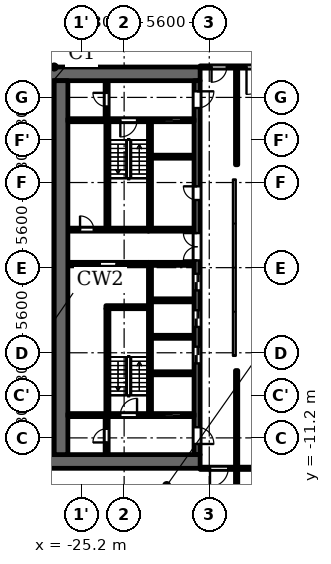
"""IFC4 building model, lengths in metres.
Left out: names, types, materials, properties, quantities, classifications, styles, units other than length and angle.
Written with IfcOpenShell. Run it as: python <this file> out.ifc"""

import sys

from ifc_helpers import new_model, si_unit, direction, frame, frame_2d, origin, origin_2d, place, context, subcontext, project, spatial, polyline, rectangle, outline, extrude, element, fill, save


model = new_model("IFC4")
c1 = context("Model", 3, precision=1e-05, world=origin(), true_north=direction((0.0, 1.0)))
c2 = subcontext(c1, "Body", "Model", "MODEL_VIEW")
j1 = project(units=[si_unit("LENGTHUNIT", "METRE"), si_unit("PLANEANGLEUNIT", "RADIAN")], contexts=[c1])
p1 = place(None, origin())
s1 = spatial("IfcSite", under=j1, at=p1, CompositionType="ELEMENT")
p2 = place(p1, origin())
s2 = spatial("IfcBuilding", under=s1, at=p2, CompositionType="ELEMENT")
p3 = place(p2, origin())
s3 = spatial("IfcBuildingStorey", under=s2, at=p3, CompositionType="ELEMENT", Elevation=0.0)
for number, where, z_axis, x_axis in (
    (1, (-28.0, 11.2, 0.0), (0.0, 0.0, 1.0), (1.0, 0.0, 0.0)),
    (2, (-28.0, 5.6, 0.0), (0.0, 0.0, 1.0), (1.0, 0.0, 0.0)),
    (3, (-28.0, 0.0, 0.0), (0.0, 0.0, 1.0), (1.0, 0.0, 0.0)),
    (4, (-28.0, -5.6, 0.0), (0.0, 0.0, 1.0), (1.0, 0.0, 0.0)),
    (5, (-28.0, -11.2, 0.0), (0.0, 0.0, 1.0), (1.0, 0.0, 0.0)),
):
    element("IfcColumn", number, at=place(p3, frame(where, z_axis=z_axis, x_axis=x_axis)), inside=s3, PredefinedType="COLUMN", context=c2, shape_type="SweptSolid", body=[
        extrude(rectangle(XDim=1.8, YDim=1.8, at=origin_2d()), origin(), (0.0, 0.0, 1.0), 6.5),
    ])
p4 = place(p3, frame((-20.7, 2.6, 0.0), z_axis=(0.0, 0.0, 1.0), x_axis=(0.0, 1.0, 0.0)))
e6 = element("IfcWall", 6, at=p4, inside=s3, PredefinedType="SHEAR", context=c2, shape_type="SweptSolid", body=[
    extrude(rectangle(XDim=7.0, YDim=0.2, at=frame_2d((3.5, 0.0))), origin(), (0.0, 0.0, 1.0), 6.15),
])
p5 = place(p3, frame((-20.7, -9.6, 0.0), z_axis=(0.0, 0.0, 1.0), x_axis=(0.0, 1.0, 0.0)))
e7 = element("IfcWall", 7, at=p5, inside=s3, PredefinedType="SHEAR", context=c2, shape_type="SweptSolid", body=[
    extrude(rectangle(XDim=9.75, YDim=0.2, at=frame_2d((4.875, 0.0))), origin(), (0.0, 0.0, 1.0), 6.15),
])
p6 = place(p3, frame((-20.8, 2.5, 0.0), z_axis=(0.0, 0.0, 1.0), x_axis=(-1.0, 0.0, 0.0)))
e8 = element("IfcWall", 8, at=p6, inside=s3, PredefinedType="SHEAR", context=c2, shape_type="SweptSolid", body=[
    extrude(rectangle(XDim=5.3, YDim=0.2, at=frame_2d((2.65, 0.0))), origin(), (0.0, 0.0, 1.0), 6.15),
])
p7 = place(p6, frame((3.6, 0.0, 0.0)))
e9 = element("IfcOpeningElement", 9, at=p7, cuts=e8, PredefinedType="OPENING", context=c2, shape_type="SweptSolid", body=[
    extrude(rectangle(XDim=0.9, YDim=2.1, at=frame_2d((0.45, 1.05))), frame((0.0, 0.11, 0.0), z_axis=(0.0, -1.0, 0.0), x_axis=(1.0, 0.0, 0.0)), (0.0, 0.0, 1.0), 0.22),
])
p8 = place(p3, frame((-20.8, 0.25, 0.0), z_axis=(0.0, 0.0, 1.0), x_axis=(-1.0, 0.0, 0.0)))
e10 = element("IfcWall", 10, at=p8, inside=s3, PredefinedType="PARTITIONING", context=c2, shape_type="SweptSolid", body=[
    extrude(rectangle(XDim=5.3, YDim=0.2, at=frame_2d((2.65, 0.0))), origin(), (0.0, 0.0, 1.0), 6.15),
])
p9 = place(p8, frame((2.1, 0.0, 0.0)))
e11 = element("IfcOpeningElement", 11, at=p9, cuts=e10, PredefinedType="OPENING", context=c2, shape_type="SweptSolid", body=[
    extrude(rectangle(XDim=1.1, YDim=2.1, at=frame_2d((0.55, 1.05))), frame((0.0, 0.11, 0.0), z_axis=(0.0, -1.0, 0.0), x_axis=(1.0, 0.0, 0.0)), (0.0, 0.0, 1.0), 0.22),
])
for number, where, z_axis, x_axis in (
    (12, (-17.4, 12.75, 0.0), (0.0, 0.0, 1.0), (-1.0, 0.0, 0.0)),
    (13, (-17.4, -12.75, 0.0), (0.0, 0.0, 1.0), (-1.0, 0.0, 0.0)),
):
    element("IfcWall", number, at=place(p3, frame(where, z_axis=z_axis, x_axis=x_axis)), inside=s3, PredefinedType="SHEAR", context=c2, shape_type="SweptSolid", body=[
        extrude(rectangle(XDim=10.4, YDim=0.9, at=frame_2d((5.2, 0.0))), origin(), (0.0, 0.0, 1.0), 6.15),
    ])
p10 = place(p3, frame((-17.6, -12.3, 0.0), z_axis=(0.0, 0.0, 1.0), x_axis=(0.0, 1.0, 0.0)))
e14 = element("IfcWall", 14, at=p10, inside=s3, PredefinedType="SHEAR", context=c2, shape_type="SweptSolid", body=[
    extrude(rectangle(XDim=24.6, YDim=0.4, at=frame_2d((12.3, 0.0))), origin(), (0.0, 0.0, 1.0), 6.15),
])
p11 = place(p10, frame((6.0, 0.0, 0.0)))
e15 = element("IfcOpeningElement", 15, at=p11, cuts=e14, PredefinedType="OPENING", context=c2, shape_type="SweptSolid", body=[
    extrude(rectangle(XDim=1.1, YDim=2.1, at=frame_2d((0.55, 1.05))), frame((0.0, 0.21, 0.0), z_axis=(0.0, -1.0, 0.0), x_axis=(1.0, 0.0, 0.0)), (0.0, 0.0, 1.0), 0.42),
])
p12 = place(p10, frame((8.4, 0.0, 0.0)))
e16 = element("IfcOpeningElement", 16, at=p12, cuts=e14, PredefinedType="OPENING", context=c2, shape_type="SweptSolid", body=[
    extrude(rectangle(XDim=1.1, YDim=2.1, at=frame_2d((0.55, 1.05))), frame((0.0, 0.21, 0.0), z_axis=(0.0, -1.0, 0.0), x_axis=(1.0, 0.0, 0.0)), (0.0, 0.0, 1.0), 0.42),
])
p13 = place(p10, frame((10.8, 0.0, 0.0)))
e17 = element("IfcOpeningElement", 17, at=p13, cuts=e14, PredefinedType="OPENING", context=c2, shape_type="SweptSolid", body=[
    extrude(rectangle(XDim=1.1, YDim=2.1, at=frame_2d((0.55, 1.05))), frame((0.0, 0.21, 0.0), z_axis=(0.0, -1.0, 0.0), x_axis=(1.0, 0.0, 0.0)), (0.0, 0.0, 1.0), 0.42),
])
p14 = place(p10, frame((16.75, 0.0, 0.0)))
e18 = element("IfcOpeningElement", 18, at=p14, cuts=e14, PredefinedType="OPENING", context=c2, shape_type="SweptSolid", body=[
    extrude(rectangle(XDim=0.9, YDim=2.1, at=frame_2d((0.45, 1.05))), frame((0.0, 0.21, 0.0), z_axis=(0.0, -1.0, 0.0), x_axis=(1.0, 0.0, 0.0)), (0.0, 0.0, 1.0), 0.42),
])
p15 = place(p10, frame((22.8, 0.0, 0.0)))
e19 = element("IfcOpeningElement", 19, at=p15, cuts=e14, PredefinedType="OPENING", context=c2, shape_type="SweptSolid", body=[
    extrude(rectangle(XDim=1.1, YDim=2.1, at=frame_2d((0.55, 1.05))), frame((0.0, 0.21, 0.0), z_axis=(0.0, -1.0, 0.0), x_axis=(1.0, 0.0, 0.0)), (0.0, 0.0, 1.0), 0.42),
])
p16 = place(p10, frame((0.7, 0.0, 0.0)))
e20 = element("IfcOpeningElement", 20, at=p16, cuts=e14, PredefinedType="OPENING", context=c2, shape_type="SweptSolid", body=[
    extrude(rectangle(XDim=1.1, YDim=2.1, at=frame_2d((0.55, 1.05))), frame((0.0, 0.21, 0.0), z_axis=(0.0, -1.0, 0.0), x_axis=(1.0, 0.0, 0.0)), (0.0, 0.0, 1.0), 0.42),
])
p17 = place(p10, frame((12.775, 0.0, 0.0)))
e21 = element("IfcOpeningElement", 21, at=p17, cuts=e14, PredefinedType="OPENING", context=c2, shape_type="SweptSolid", body=[
    extrude(rectangle(XDim=1.8, YDim=2.1, at=frame_2d((0.9, 1.05))), frame((0.0, 0.21, 0.0), z_axis=(0.0, -1.0, 0.0), x_axis=(1.0, 0.0, 0.0)), (0.0, 0.0, 1.0), 0.42),
])
p18 = place(p3, frame((-26.55, -12.3, 0.0), z_axis=(0.0, 0.0, 1.0), x_axis=(0.0, 1.0, 0.0)))
e22 = element("IfcWall", 22, at=p18, inside=s3, PredefinedType="SHEAR", context=c2, shape_type="SweptSolid", body=[
    extrude(rectangle(XDim=24.6, YDim=0.9, at=frame_2d((12.3, 0.0))), origin(), (0.0, 0.0, 1.0), 6.15),
])
p19 = place(p3, frame((-23.55, 9.8, 0.0), z_axis=(0.0, 0.0, 1.0), x_axis=(0.0, 1.0, 0.0)))
e23 = element("IfcWall", 23, at=p19, inside=s3, PredefinedType="PARTITIONING", context=c2, shape_type="SweptSolid", body=[
    extrude(rectangle(XDim=2.5, YDim=0.2, at=frame_2d((1.25, 0.0))), origin(), (0.0, 0.0, 1.0), 6.15),
])
p20 = place(p19, frame((0.8, 0.0, 0.0)))
e24 = element("IfcOpeningElement", 24, at=p20, cuts=e23, PredefinedType="OPENING", context=c2, shape_type="SweptSolid", body=[
    extrude(rectangle(XDim=0.9, YDim=2.1, at=frame_2d((0.45, 1.05))), frame((0.0, 0.11, 0.0), z_axis=(0.0, -1.0, 0.0), x_axis=(1.0, 0.0, 0.0)), (0.0, 0.0, 1.0), 0.22),
])
p21 = place(p3, frame((-23.55, -12.3, 0.0), z_axis=(0.0, 0.0, 1.0), x_axis=(0.0, 1.0, 0.0)))
e25 = element("IfcWall", 25, at=p21, inside=s3, PredefinedType="PARTITIONING", context=c2, shape_type="SweptSolid", body=[
    extrude(rectangle(XDim=2.5, YDim=0.2, at=frame_2d((1.25, 0.0))), origin(), (0.0, 0.0, 1.0), 6.15),
])
p22 = place(p21, frame((0.8, 0.0, 0.0)))
e26 = element("IfcOpeningElement", 26, at=p22, cuts=e25, PredefinedType="OPENING", context=c2, shape_type="SweptSolid", body=[
    extrude(rectangle(XDim=0.9, YDim=2.1, at=frame_2d((0.45, 1.05))), frame((0.0, 0.11, 0.0), z_axis=(0.0, -1.0, 0.0), x_axis=(1.0, 0.0, 0.0)), (0.0, 0.0, 1.0), 0.22),
])
p23 = place(p3, frame((-17.8, -9.7, 0.0), z_axis=(0.0, 0.0, 1.0), x_axis=(-1.0, 0.0, 0.0)))
e27 = element("IfcWall", 27, at=p23, inside=s3, PredefinedType="SHEAR", context=c2, shape_type="SweptSolid", body=[
    extrude(rectangle(XDim=8.3, YDim=0.2, at=frame_2d((4.15, 0.0))), origin(), (0.0, 0.0, 1.0), 6.15),
])
p24 = place(p23, frame((0.85, 0.0, 0.0)))
e28 = element("IfcOpeningElement", 28, at=p24, cuts=e27, PredefinedType="OPENING", context=c2, shape_type="SweptSolid", body=[
    extrude(rectangle(XDim=1.1, YDim=2.1, at=frame_2d((0.55, 1.05))), frame((0.0, 0.11, 0.0), z_axis=(0.0, -1.0, 0.0), x_axis=(1.0, 0.0, 0.0)), (0.0, 0.0, 1.0), 0.22),
])
p25 = place(p23, frame((3.75, 0.0, 0.0)))
e29 = element("IfcOpeningElement", 29, at=p25, cuts=e27, PredefinedType="OPENING", context=c2, shape_type="SweptSolid", body=[
    extrude(rectangle(XDim=1.1, YDim=2.1, at=frame_2d((0.55, 1.05))), frame((0.0, 0.11, 0.0), z_axis=(0.0, -1.0, 0.0), x_axis=(1.0, 0.0, 0.0)), (0.0, 0.0, 1.0), 0.22),
])
for number, where, z_axis, x_axis in (
    (30, (-17.8, -6.95, 0.0), (0.0, 0.0, 1.0), (-1.0, 0.0, 0.0)),
    (31, (-17.8, -4.55, 0.0), (0.0, 0.0, 1.0), (-1.0, 0.0, 0.0)),
    (32, (-17.8, -2.15, 0.0), (0.0, 0.0, 1.0), (-1.0, 0.0, 0.0)),
):
    element("IfcWall", number, at=place(p3, frame(where, z_axis=z_axis, x_axis=x_axis)), inside=s3, PredefinedType="PARTITIONING", context=c2, shape_type="SweptSolid", body=[
        extrude(rectangle(XDim=2.8, YDim=0.2, at=frame_2d((1.4, 0.0))), origin(), (0.0, 0.0, 1.0), 6.15),
    ])
for number, where, z_axis, x_axis in (
    (33, (-17.8, 0.25, 0.0), (0.0, 0.0, 1.0), (-1.0, 0.0, 0.0)),
    (34, (-17.8, 2.5, 0.0), (0.0, 0.0, 1.0), (-1.0, 0.0, 0.0)),
):
    element("IfcWall", number, at=place(p3, frame(where, z_axis=z_axis, x_axis=x_axis)), inside=s3, PredefinedType="PARTITIONING", context=c2, shape_type="SweptSolid", body=[
        extrude(rectangle(XDim=3.0, YDim=0.2, at=frame_2d((1.5, 0.0))), origin(), (0.0, 0.0, 1.0), 6.15),
    ])
p26 = place(p3, frame((-17.8, 7.3, 0.0), z_axis=(0.0, 0.0, 1.0), x_axis=(-1.0, 0.0, 0.0)))
e35 = element("IfcWall", 35, at=p26, inside=s3, PredefinedType="PARTITIONING", context=c2, shape_type="SweptSolid", body=[
    extrude(rectangle(XDim=2.8, YDim=0.2, at=frame_2d((1.4, 0.0))), origin(), (0.0, 0.0, 1.0), 6.15),
])
p27 = place(p3, frame((-17.8, 9.7, 0.0), z_axis=(0.0, 0.0, 1.0), x_axis=(-1.0, 0.0, 0.0)))
e36 = element("IfcWall", 36, at=p27, inside=s3, PredefinedType="SHEAR", context=c2, shape_type="SweptSolid", body=[
    extrude(rectangle(XDim=8.3, YDim=0.2, at=frame_2d((4.15, 0.0))), origin(), (0.0, 0.0, 1.0), 6.15),
])
p28 = place(p27, frame((0.85, 0.0, 0.0)))
e37 = element("IfcOpeningElement", 37, at=p28, cuts=e36, PredefinedType="OPENING", context=c2, shape_type="SweptSolid", body=[
    extrude(rectangle(XDim=1.1, YDim=2.1, at=frame_2d((0.55, 1.05))), frame((0.0, 0.11, 0.0), z_axis=(0.0, -1.0, 0.0), x_axis=(1.0, 0.0, 0.0)), (0.0, 0.0, 1.0), 0.22),
])
p29 = place(p27, frame((3.75, 0.0, 0.0)))
e38 = element("IfcOpeningElement", 38, at=p29, cuts=e36, PredefinedType="OPENING", context=c2, shape_type="SweptSolid", body=[
    extrude(rectangle(XDim=1.1, YDim=2.1, at=frame_2d((0.55, 1.05))), frame((0.0, 0.11, 0.0), z_axis=(0.0, -1.0, 0.0), x_axis=(1.0, 0.0, 0.0)), (0.0, 0.0, 1.0), 0.22),
])
p30 = place(p3, frame((-23.5, 2.6, 0.0), z_axis=(0.0, 0.0, 1.0), x_axis=(0.0, 1.0, 0.0)))
e39 = element("IfcWall", 39, at=p30, inside=s3, PredefinedType="SHEAR", context=c2, shape_type="SweptSolid", body=[
    extrude(rectangle(XDim=7.0, YDim=0.2, at=frame_2d((3.5, 0.0))), origin(), (0.0, 0.0, 1.0), 6.15),
])
p31 = place(p3, frame((-23.5, -9.6, 0.0), z_axis=(0.0, 0.0, 1.0), x_axis=(0.0, 1.0, 0.0)))
e40 = element("IfcWall", 40, at=p31, inside=s3, PredefinedType="SHEAR", context=c2, shape_type="SweptSolid", body=[
    extrude(rectangle(XDim=6.9, YDim=0.2, at=frame_2d((3.45, 0.0))), origin(), (0.0, 0.0, 1.0), 6.15),
])
p32 = place(p3, frame((-20.8, -2.6, 0.0), z_axis=(0.0, 0.0, 1.0), x_axis=(-1.0, 0.0, 0.0)))
e41 = element("IfcWall", 41, at=p32, inside=s3, PredefinedType="SHEAR", context=c2, shape_type="SweptSolid", body=[
    extrude(rectangle(XDim=2.8, YDim=0.2, at=frame_2d((1.4, 0.0))), origin(), (0.0, 0.0, 1.0), 6.15),
])
p33 = place(p3, frame((-17.4, -13.2, 0.0), z_axis=(0.0, 0.0, 1.0), x_axis=(1.0, 0.0, 0.0)))
e42 = element("IfcWall", 42, at=p33, inside=s3, PredefinedType="PARTITIONING", context=c2, shape_type="SweptSolid", body=[
    extrude(rectangle(XDim=34.8, YDim=0.15, at=frame_2d((17.4, 0.0))), origin(), (0.0, 0.0, 1.0), 6.15),
])
p34 = place(p33, frame((13.95, 0.0, 0.0)))
e43 = element("IfcOpeningElement", 43, at=p34, cuts=e42, PredefinedType="OPENING", context=c2, shape_type="SweptSolid", body=[
    extrude(rectangle(XDim=1.8, YDim=2.1, at=frame_2d((0.9, 1.05))), frame((0.0, 0.085, 0.0), z_axis=(0.0, -1.0, 0.0), x_axis=(1.0, 0.0, 0.0)), (0.0, 0.0, 1.0), 0.17),
])
p35 = place(p33, frame((33.05, 0.0, 0.0)))
e44 = element("IfcOpeningElement", 44, at=p35, cuts=e42, PredefinedType="OPENING", context=c2, shape_type="SweptSolid", body=[
    extrude(rectangle(XDim=1.2, YDim=2.1, at=frame_2d((0.6, 1.05))), frame((0.0, 0.085, 0.0), z_axis=(0.0, -1.0, 0.0), x_axis=(1.0, 0.0, 0.0)), (0.0, 0.0, 1.0), 0.17),
])
p36 = place(p33, frame((0.65, 0.0, 0.0)))
e45 = element("IfcOpeningElement", 45, at=p36, cuts=e42, PredefinedType="OPENING", context=c2, shape_type="SweptSolid", body=[
    extrude(rectangle(XDim=1.2, YDim=2.1, at=frame_2d((0.6, 1.05))), frame((0.0, 0.085, 0.0), z_axis=(0.0, -1.0, 0.0), x_axis=(1.0, 0.0, 0.0)), (0.0, 0.0, 1.0), 0.17),
])
p37 = place(p3, frame((-17.4, 13.2, 0.0), z_axis=(0.0, 0.0, 1.0), x_axis=(1.0, 0.0, 0.0)))
e46 = element("IfcWall", 46, at=p37, inside=s3, PredefinedType="PARTITIONING", context=c2, shape_type="SweptSolid", body=[
    extrude(rectangle(XDim=34.8, YDim=0.15, at=frame_2d((17.4, 0.0))), origin(), (0.0, 0.0, 1.0), 6.15),
])
p38 = place(p37, frame((3.05, 0.0, 0.0)))
e47 = element("IfcOpeningElement", 47, at=p38, cuts=e46, PredefinedType="OPENING", context=c2, shape_type="SweptSolid", body=[
    extrude(rectangle(XDim=1.8, YDim=2.1, at=frame_2d((0.9, 1.05))), frame((0.0, 0.085, 0.0), z_axis=(0.0, -1.0, 0.0), x_axis=(1.0, 0.0, 0.0)), (0.0, 0.0, 1.0), 0.17),
])
p39 = place(p37, frame((0.75, 0.0, 0.0)))
e48 = element("IfcOpeningElement", 48, at=p39, cuts=e46, PredefinedType="OPENING", context=c2, shape_type="SweptSolid", body=[
    extrude(rectangle(XDim=1.0, YDim=2.1, at=frame_2d((0.5, 1.05))), frame((0.0, 0.085, 0.0), z_axis=(0.0, -1.0, 0.0), x_axis=(1.0, 0.0, 0.0)), (0.0, 0.0, 1.0), 0.17),
])
p40 = place(p37, frame((33.15, 0.0, 0.0)))
e49 = element("IfcOpeningElement", 49, at=p40, cuts=e46, PredefinedType="OPENING", context=c2, shape_type="SweptSolid", body=[
    extrude(rectangle(XDim=1.0, YDim=2.1, at=frame_2d((0.5, 1.05))), frame((0.0, 0.085, 0.0), z_axis=(0.0, -1.0, 0.0), x_axis=(1.0, 0.0, 0.0)), (0.0, 0.0, 1.0), 0.17),
])
p41 = place(p3, frame((-15.0, -15.525, 0.0), z_axis=(0.0, 0.0, 1.0), x_axis=(0.0, 1.0, 0.0)))
e50 = element("IfcWall", 50, at=p41, inside=s3, PredefinedType="PARTITIONING", context=c2, shape_type="SweptSolid", body=[
    extrude(rectangle(XDim=2.25, YDim=0.15, at=frame_2d((1.125, 0.0))), origin(), (0.0, 0.0, 1.0), 6.15),
])
for number, where, z_axis, x_axis in (
    (51, (-15.0, -13.125, 0.0), (0.0, 0.0, 1.0), (0.0, 1.0, 0.0)),
    (52, (-15.0, 6.769, 0.0), (0.0, 0.0, 1.0), (0.0, 1.0, 0.0)),
):
    element("IfcWall", number, at=place(p3, frame(where, z_axis=z_axis, x_axis=x_axis)), inside=s3, PredefinedType="PARTITIONING", context=c2, shape_type="SweptSolid", body=[
        extrude(rectangle(XDim=6.356, YDim=0.15, at=frame_2d((3.178, 0.0))), origin(), (0.0, 0.0, 1.0), 6.15),
    ])
p42 = place(p3, origin())
e53 = element("IfcWall", 53, at=p42, inside=s3, PredefinedType="SOLIDWALL", context=c2, shape_type="SweptSolid", body=[
    extrude(outline(polyline([(-13.849, 7.3), (-14.937, 6.937), (-15.3, 5.849), (-15.3, 5.8), (-15.0, 5.8), (-14.7, 6.7), (-13.8, 7.0), (-13.8, 7.3), (-13.849, 7.3)])), origin(), (0.0, 0.0, 1.0), 6.15),
])
e54 = element("IfcWall", 54, at=p42, inside=s3, PredefinedType="SOLIDWALL", context=c2, shape_type="SweptSolid", body=[
    extrude(outline(polyline([(-14.937, -6.937), (-13.849, -7.3), (-13.8, -7.3), (-13.8, -7.0), (-14.7, -6.7), (-15.0, -5.8), (-15.3, -5.8), (-15.3, -5.849), (-14.937, -6.937)])), origin(), (0.0, 0.0, 1.0), 6.15),
])
p43 = place(p24, origin())
e55 = element("IfcDoor", 55, at=p43, inside=s3, OperationType="DOUBLE_DOOR_SLIDING", PredefinedType="DOOR", context=c2, shape_type="SweptSolid", body=[
    extrude(rectangle(XDim=1.1, YDim=2.1, at=frame_2d((0.55, 1.05))), frame((0.0, 0.025, 0.0), z_axis=(0.0, -1.0, 0.0), x_axis=(1.0, 0.0, 0.0)), (0.0, 0.0, 1.0), 0.05),
])
fill(e28, e55)
p44 = place(p11, origin())
e56 = element("IfcDoor", 56, at=p44, inside=s3, OperationType="DOUBLE_DOOR_SLIDING", PredefinedType="DOOR", context=c2, shape_type="SweptSolid", body=[
    extrude(rectangle(XDim=1.1, YDim=2.1, at=frame_2d((0.55, 1.05))), frame((0.0, 0.025, 0.0), z_axis=(0.0, -1.0, 0.0), x_axis=(1.0, 0.0, 0.0)), (0.0, 0.0, 1.0), 0.05),
])
fill(e15, e56)
p45 = place(p12, origin())
e57 = element("IfcDoor", 57, at=p45, inside=s3, OperationType="DOUBLE_DOOR_SLIDING", PredefinedType="DOOR", context=c2, shape_type="SweptSolid", body=[
    extrude(rectangle(XDim=1.1, YDim=2.1, at=frame_2d((0.55, 1.05))), frame((0.0, 0.025, 0.0), z_axis=(0.0, -1.0, 0.0), x_axis=(1.0, 0.0, 0.0)), (0.0, 0.0, 1.0), 0.05),
])
fill(e16, e57)
p46 = place(p13, origin())
e58 = element("IfcDoor", 58, at=p46, inside=s3, OperationType="DOUBLE_DOOR_SLIDING", PredefinedType="DOOR", context=c2, shape_type="SweptSolid", body=[
    extrude(rectangle(XDim=1.1, YDim=2.1, at=frame_2d((0.55, 1.05))), frame((0.0, 0.025, 0.0), z_axis=(0.0, -1.0, 0.0), x_axis=(1.0, 0.0, 0.0)), (0.0, 0.0, 1.0), 0.05),
])
fill(e17, e58)
p47 = place(p14, origin())
e59 = element("IfcDoor", 59, at=p47, inside=s3, OperationType="SINGLE_SWING_LEFT", PredefinedType="DOOR", context=c2, shape_type="SweptSolid", body=[
    extrude(rectangle(XDim=0.9, YDim=2.1, at=frame_2d((0.45, 1.05))), frame((0.0, 0.025, 0.0), z_axis=(0.0, -1.0, 0.0), x_axis=(1.0, 0.0, 0.0)), (0.0, 0.0, 1.0), 0.05),
])
fill(e18, e59)
p48 = place(p28, origin())
e60 = element("IfcDoor", 60, at=p48, inside=s3, OperationType="DOUBLE_DOOR_SLIDING", PredefinedType="DOOR", context=c2, shape_type="SweptSolid", body=[
    extrude(rectangle(XDim=1.1, YDim=2.1, at=frame_2d((0.55, 1.05))), frame((0.0, 0.025, 0.0), z_axis=(0.0, -1.0, 0.0), x_axis=(1.0, 0.0, 0.0)), (0.0, 0.0, 1.0), 0.05),
])
fill(e37, e60)
p49 = place(p15, origin())
e61 = element("IfcDoor", 61, at=p49, inside=s3, OperationType="SINGLE_SWING_RIGHT", PredefinedType="DOOR", context=c2, shape_type="SweptSolid", body=[
    extrude(rectangle(XDim=1.1, YDim=2.1, at=frame_2d((0.55, 1.05))), frame((0.0, 0.025, 0.0), z_axis=(0.0, -1.0, 0.0), x_axis=(1.0, 0.0, 0.0)), (0.0, 0.0, 1.0), 0.05),
])
fill(e19, e61)
p50 = place(p16, origin())
e62 = element("IfcDoor", 62, at=p50, inside=s3, OperationType="SINGLE_SWING_LEFT", PredefinedType="DOOR", context=c2, shape_type="SweptSolid", body=[
    extrude(rectangle(XDim=1.1, YDim=2.1, at=frame_2d((0.55, 1.05))), frame((0.0, 0.025, 0.0), z_axis=(0.0, -1.0, 0.0), x_axis=(1.0, 0.0, 0.0)), (0.0, 0.0, 1.0), 0.05),
])
fill(e20, e62)
p51 = place(p20, origin())
e63 = element("IfcDoor", 63, at=p51, inside=s3, OperationType="SINGLE_SWING_LEFT", PredefinedType="DOOR", context=c2, shape_type="SweptSolid", body=[
    extrude(rectangle(XDim=0.9, YDim=2.1, at=frame_2d((0.45, 1.05))), frame((0.0, 0.025, 0.0), z_axis=(0.0, -1.0, 0.0), x_axis=(1.0, 0.0, 0.0)), (0.0, 0.0, 1.0), 0.05),
])
fill(e24, e63)
p52 = place(p22, origin())
e64 = element("IfcDoor", 64, at=p52, inside=s3, OperationType="SINGLE_SWING_RIGHT", PredefinedType="DOOR", context=c2, shape_type="SweptSolid", body=[
    extrude(rectangle(XDim=0.9, YDim=2.1, at=frame_2d((0.45, 1.05))), frame((0.0, 0.025, 0.0), z_axis=(0.0, -1.0, 0.0), x_axis=(1.0, 0.0, 0.0)), (0.0, 0.0, 1.0), 0.05),
])
fill(e26, e64)
p53 = place(p29, origin())
e65 = element("IfcDoor", 65, at=p53, inside=s3, OperationType="SINGLE_SWING_LEFT", PredefinedType="DOOR", context=c2, shape_type="SweptSolid", body=[
    extrude(rectangle(XDim=1.1, YDim=2.1, at=frame_2d((0.55, 1.05))), frame((0.0, 0.025, 0.0), z_axis=(0.0, -1.0, 0.0), x_axis=(1.0, 0.0, 0.0)), (0.0, 0.0, 1.0), 0.05),
])
fill(e38, e65)
p54 = place(p25, origin())
e66 = element("IfcDoor", 66, at=p54, inside=s3, OperationType="SINGLE_SWING_LEFT", PredefinedType="DOOR", context=c2, shape_type="SweptSolid", body=[
    extrude(rectangle(XDim=1.1, YDim=2.1, at=frame_2d((0.55, 1.05))), frame((0.0, 0.025, 0.0), z_axis=(0.0, -1.0, 0.0), x_axis=(1.0, 0.0, 0.0)), (0.0, 0.0, 1.0), 0.05),
])
fill(e29, e66)
p55 = place(p17, origin())
e67 = element("IfcDoor", 67, at=p55, inside=s3, OperationType="DOUBLE_DOOR_SINGLE_SWING", PredefinedType="DOOR", context=c2, shape_type="SweptSolid", body=[
    extrude(rectangle(XDim=1.8, YDim=2.1, at=frame_2d((0.9, 1.05))), frame((0.0, 0.025, 0.0), z_axis=(0.0, -1.0, 0.0), x_axis=(1.0, 0.0, 0.0)), (0.0, 0.0, 1.0), 0.05),
])
fill(e21, e67)
p56 = place(p9, origin())
e68 = element("IfcDoor", 68, at=p56, inside=s3, OperationType="SINGLE_SWING_RIGHT", PredefinedType="DOOR", context=c2, shape_type="SweptSolid", body=[
    extrude(rectangle(XDim=1.1, YDim=2.1, at=frame_2d((0.55, 1.05))), frame((0.0, 0.025, 0.0), z_axis=(0.0, -1.0, 0.0), x_axis=(1.0, 0.0, 0.0)), (0.0, 0.0, 1.0), 0.05),
])
fill(e11, e68)
p57 = place(p7, origin())
e69 = element("IfcDoor", 69, at=p57, inside=s3, OperationType="SINGLE_SWING_RIGHT", PredefinedType="DOOR", context=c2, shape_type="SweptSolid", body=[
    extrude(rectangle(XDim=0.9, YDim=2.1, at=frame_2d((0.45, 1.05))), frame((0.0, 0.025, 0.0), z_axis=(0.0, -1.0, 0.0), x_axis=(1.0, 0.0, 0.0)), (0.0, 0.0, 1.0), 0.05),
])
fill(e9, e69)
p58 = place(p38, origin())
e70 = element("IfcDoor", 70, at=p58, inside=s3, OperationType="SINGLE_SWING_LEFT", PredefinedType="DOOR", context=c2, shape_type="SweptSolid", body=[
    extrude(rectangle(XDim=1.8, YDim=2.1, at=frame_2d((0.9, 1.05))), frame((0.0, 0.025, 0.0), z_axis=(0.0, -1.0, 0.0), x_axis=(1.0, 0.0, 0.0)), (0.0, 0.0, 1.0), 0.05),
])
fill(e47, e70)
p59 = place(p39, origin())
e71 = element("IfcDoor", 71, at=p59, inside=s3, OperationType="SINGLE_SWING_LEFT", PredefinedType="DOOR", context=c2, shape_type="SweptSolid", body=[
    extrude(rectangle(XDim=1.0, YDim=2.1, at=frame_2d((0.5, 1.05))), frame((0.0, 0.025, 0.0), z_axis=(0.0, -1.0, 0.0), x_axis=(1.0, 0.0, 0.0)), (0.0, 0.0, 1.0), 0.05),
])
fill(e48, e71)
p60 = place(p36, origin())
e72 = element("IfcDoor", 72, at=p60, inside=s3, OperationType="SINGLE_SWING_LEFT", PredefinedType="DOOR", context=c2, shape_type="SweptSolid", body=[
    extrude(rectangle(XDim=1.2, YDim=2.1, at=frame_2d((0.6, 1.05))), frame((0.0, 0.025, 0.0), z_axis=(0.0, -1.0, 0.0), x_axis=(1.0, 0.0, 0.0)), (0.0, 0.0, 1.0), 0.05),
])
fill(e45, e72)
save(model, sys.argv[1])
